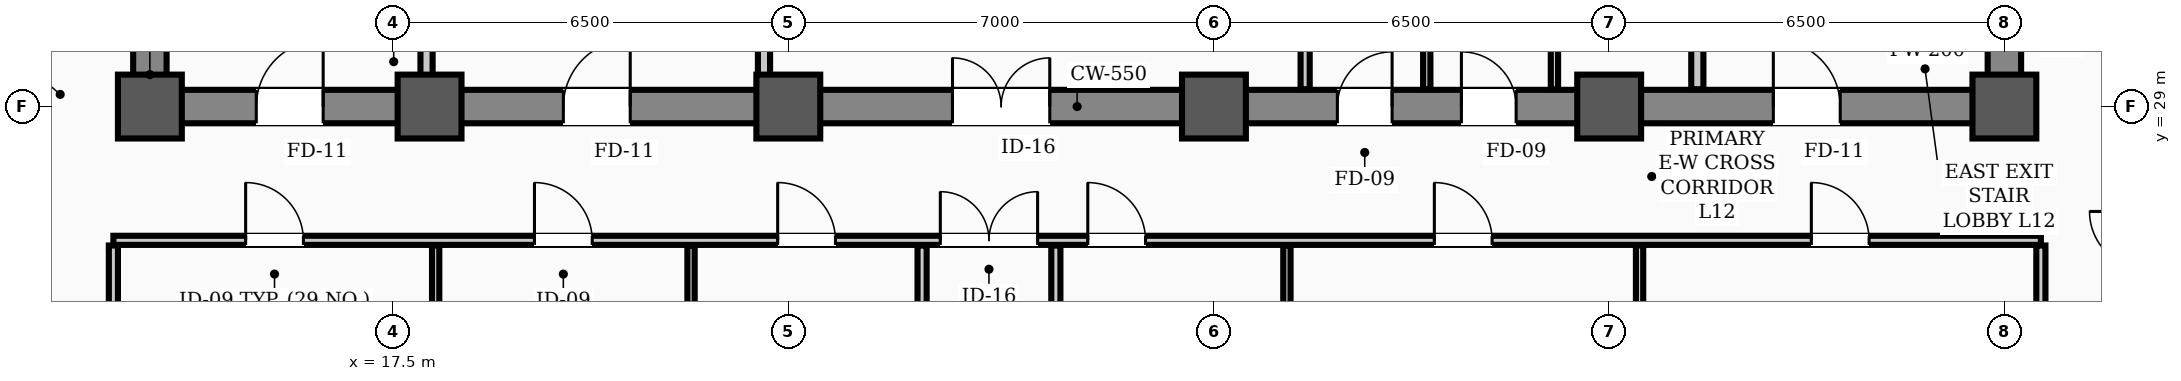
"""IFC4 building model, lengths in metres.
Left out: names, types, materials, properties, quantities, classifications, styles, units other than length and angle.
Written with IfcOpenShell. Run it as: python <this file> out.ifc"""

import sys

from ifc_helpers import new_model, si_unit, direction, frame, frame_2d, origin, origin_2d, place, context, subcontext, project, spatial, rectangle, hollow_rectangle, extrude, element, fill, save


model = new_model("IFC4")
c1 = context("Model", 3, precision=1e-05, world=origin(), true_north=direction((0.0, 1.0)))
c2 = subcontext(c1, "Body", "Model", "MODEL_VIEW")
j1 = project(units=[si_unit("LENGTHUNIT", "METRE"), si_unit("PLANEANGLEUNIT", "RADIAN")], contexts=[c1])
p1 = place(None, origin())
s1 = spatial("IfcSite", under=j1, at=p1, CompositionType="ELEMENT")
p2 = place(p1, origin())
s2 = spatial("IfcBuilding", under=s1, at=p2, CompositionType="ELEMENT")
p3 = place(p2, frame((0.0, 0.0, 49.9)))
s3 = spatial("IfcBuildingStorey", under=s2, at=p3, CompositionType="ELEMENT", Elevation=49.9)
for number, where, z_axis, x_axis in (
    (1, (13.5, 29.0, 0.0), (0.0, 0.0, 1.0), (1.0, 0.0, 0.0)),
    (2, (18.1, 29.0, 0.0), (0.0, 0.0, 1.0), (1.0, 0.0, 0.0)),
    (3, (24.0, 29.0, 0.0), (0.0, 0.0, 1.0), (1.0, 0.0, 0.0)),
    (4, (31.0, 29.0, 0.0), (0.0, 0.0, 1.0), (1.0, 0.0, 0.0)),
    (5, (37.5, 29.0, 0.0), (0.0, 0.0, 1.0), (1.0, 0.0, 0.0)),
    (6, (44.0, 29.0, 0.0), (0.0, 0.0, 1.0), (1.0, 0.0, 0.0)),
):
    element("IfcColumn", number, at=place(p3, frame(where, z_axis=z_axis, x_axis=x_axis)), inside=s3, PredefinedType="COLUMN", context=c2, shape_type="SweptSolid", body=[
        extrude(hollow_rectangle(XDim=1.05, YDim=1.05, WallThickness=0.038, InnerFilletRadius=0.019, OuterFilletRadius=0.057, at=origin_2d()), origin(), (0.0, 0.0, 1.0), 3.9),
    ])
p4 = place(p3, frame((13.5, 29.0, 0.0), z_axis=(0.0, 0.0, 1.0), x_axis=(1.0, 0.0, 0.0)))
e7 = element("IfcWall", 7, at=p4, inside=s3, PredefinedType="SHEAR", context=c2, shape_type="SweptSolid", body=[
    extrude(rectangle(XDim=30.5, YDim=0.55, at=frame_2d((15.25, 0.0))), origin(), (0.0, 0.0, 1.0), 3.66),
])
p5 = place(p4, frame((1.75, 0.0, 0.0)))
e8 = element("IfcOpeningElement", 8, at=p5, cuts=e7, PredefinedType="OPENING", context=c2, shape_type="SweptSolid", body=[
    extrude(rectangle(XDim=1.1, YDim=2.08, at=frame_2d((0.55, 1.04))), frame((0.0, 0.285, 0.0), z_axis=(0.0, -1.0, 0.0), x_axis=(1.0, 0.0, 0.0)), (0.0, 0.0, 1.0), 0.57),
])
p6 = place(p4, frame((26.7, 0.0, 0.0)))
e9 = element("IfcOpeningElement", 9, at=p6, cuts=e7, PredefinedType="OPENING", context=c2, shape_type="SweptSolid", body=[
    extrude(rectangle(XDim=1.1, YDim=2.08, at=frame_2d((0.55, 1.04))), frame((0.0, 0.285, 0.0), z_axis=(0.0, -1.0, 0.0), x_axis=(1.0, 0.0, 0.0)), (0.0, 0.0, 1.0), 0.57),
])
p7 = place(p4, frame((6.8, 0.0, 0.0)))
e10 = element("IfcOpeningElement", 10, at=p7, cuts=e7, PredefinedType="OPENING", context=c2, shape_type="SweptSolid", body=[
    extrude(rectangle(XDim=1.1, YDim=2.08, at=frame_2d((0.55, 1.04))), frame((0.0, 0.285, 0.0), z_axis=(0.0, -1.0, 0.0), x_axis=(1.0, 0.0, 0.0)), (0.0, 0.0, 1.0), 0.57),
])
p8 = place(p4, frame((13.2, 0.0, 0.0)))
e11 = element("IfcOpeningElement", 11, at=p8, cuts=e7, PredefinedType="OPENING", context=c2, shape_type="SweptSolid", body=[
    extrude(rectangle(XDim=1.6, YDim=2.08, at=frame_2d((0.8, 1.04))), frame((0.0, 0.285, 0.0), z_axis=(0.0, -1.0, 0.0), x_axis=(1.0, 0.0, 0.0)), (0.0, 0.0, 1.0), 0.57),
])
p9 = place(p4, frame((19.53, 0.0, 0.0)))
e12 = element("IfcOpeningElement", 12, at=p9, cuts=e7, PredefinedType="OPENING", context=c2, shape_type="SweptSolid", body=[
    extrude(rectangle(XDim=0.9, YDim=2.08, at=frame_2d((0.45, 1.04))), frame((0.0, 0.285, 0.0), z_axis=(0.0, -1.0, 0.0), x_axis=(1.0, 0.0, 0.0)), (0.0, 0.0, 1.0), 0.57),
])
p10 = place(p4, frame((21.57, 0.0, 0.0)))
e13 = element("IfcOpeningElement", 13, at=p10, cuts=e7, PredefinedType="OPENING", context=c2, shape_type="SweptSolid", body=[
    extrude(rectangle(XDim=0.9, YDim=2.08, at=frame_2d((0.45, 1.04))), frame((0.0, 0.285, 0.0), z_axis=(0.0, -1.0, 0.0), x_axis=(1.0, 0.0, 0.0)), (0.0, 0.0, 1.0), 0.57),
])
for number, where, z_axis, x_axis in (
    (14, (13.5, 29.35, 0.0), (0.0, 0.0, 1.0), (0.0, 1.0, 0.0)),
    (15, (44.0, 29.35, 0.0), (0.0, 0.0, 1.0), (0.0, 1.0, 0.0)),
):
    element("IfcWall", number, at=place(p3, frame(where, z_axis=z_axis, x_axis=x_axis)), inside=s3, PredefinedType="SHEAR", context=c2, shape_type="SweptSolid", body=[
        extrude(rectangle(XDim=8.6, YDim=0.55, at=frame_2d((4.3, 0.0))), origin(), (0.0, 0.0, 1.0), 3.66),
    ])
p11 = place(p3, frame((12.9, 26.8, 0.0), z_axis=(0.0, 0.0, 1.0), x_axis=(1.0, 0.0, 0.0)))
e16 = element("IfcWall", 16, at=p11, inside=s3, PredefinedType="PARTITIONING", context=c2, shape_type="SweptSolid", body=[
    extrude(rectangle(XDim=31.7, YDim=0.15, at=frame_2d((15.85, 0.0))), origin(), (0.0, 0.0, 1.0), 2.24),
])
p12 = place(p11, frame((13.6, 0.0, 0.0)))
e17 = element("IfcOpeningElement", 17, at=p12, cuts=e16, PredefinedType="OPENING", context=c2, shape_type="SweptSolid", body=[
    extrude(rectangle(XDim=1.6, YDim=2.08, at=frame_2d((0.8, 1.04))), frame((0.0, 0.085, 0.0), z_axis=(0.0, -1.0, 0.0), x_axis=(1.0, 0.0, 0.0)), (0.0, 0.0, 1.0), 0.17),
])
p13 = place(p11, frame((2.175, 0.0, 0.0)))
e18 = element("IfcOpeningElement", 18, at=p13, cuts=e16, PredefinedType="OPENING", context=c2, shape_type="SweptSolid", body=[
    extrude(rectangle(XDim=0.95, YDim=2.08, at=frame_2d((0.475, 1.04))), frame((0.0, 0.085, 0.0), z_axis=(0.0, -1.0, 0.0), x_axis=(1.0, 0.0, 0.0)), (0.0, 0.0, 1.0), 0.17),
])
p14 = place(p11, frame((6.925, 0.0, 0.0)))
e19 = element("IfcOpeningElement", 19, at=p14, cuts=e16, PredefinedType="OPENING", context=c2, shape_type="SweptSolid", body=[
    extrude(rectangle(XDim=0.95, YDim=2.08, at=frame_2d((0.475, 1.04))), frame((0.0, 0.085, 0.0), z_axis=(0.0, -1.0, 0.0), x_axis=(1.0, 0.0, 0.0)), (0.0, 0.0, 1.0), 0.17),
])
p15 = place(p11, frame((10.925, 0.0, 0.0)))
e20 = element("IfcOpeningElement", 20, at=p15, cuts=e16, PredefinedType="OPENING", context=c2, shape_type="SweptSolid", body=[
    extrude(rectangle(XDim=0.95, YDim=2.08, at=frame_2d((0.475, 1.04))), frame((0.0, 0.085, 0.0), z_axis=(0.0, -1.0, 0.0), x_axis=(1.0, 0.0, 0.0)), (0.0, 0.0, 1.0), 0.17),
])
p16 = place(p11, frame((16.025, 0.0, 0.0)))
e21 = element("IfcOpeningElement", 21, at=p16, cuts=e16, PredefinedType="OPENING", context=c2, shape_type="SweptSolid", body=[
    extrude(rectangle(XDim=0.95, YDim=2.08, at=frame_2d((0.475, 1.04))), frame((0.0, 0.085, 0.0), z_axis=(0.0, -1.0, 0.0), x_axis=(1.0, 0.0, 0.0)), (0.0, 0.0, 1.0), 0.17),
])
p17 = place(p11, frame((21.725, 0.0, 0.0)))
e22 = element("IfcOpeningElement", 22, at=p17, cuts=e16, PredefinedType="OPENING", context=c2, shape_type="SweptSolid", body=[
    extrude(rectangle(XDim=0.95, YDim=2.08, at=frame_2d((0.475, 1.04))), frame((0.0, 0.085, 0.0), z_axis=(0.0, -1.0, 0.0), x_axis=(1.0, 0.0, 0.0)), (0.0, 0.0, 1.0), 0.17),
])
p18 = place(p11, frame((27.925, 0.0, 0.0)))
e23 = element("IfcOpeningElement", 23, at=p18, cuts=e16, PredefinedType="OPENING", context=c2, shape_type="SweptSolid", body=[
    extrude(rectangle(XDim=0.95, YDim=2.08, at=frame_2d((0.475, 1.04))), frame((0.0, 0.085, 0.0), z_axis=(0.0, -1.0, 0.0), x_axis=(1.0, 0.0, 0.0)), (0.0, 0.0, 1.0), 0.17),
])
for number, where, z_axis, x_axis in (
    (24, (18.05, 29.285, 0.0), (0.0, 0.0, 1.0), (0.0, 1.0, 0.0)),
    (25, (38.95, 29.285, 0.0), (0.0, 0.0, 1.0), (0.0, 1.0, 0.0)),
):
    element("IfcWall", number, at=place(p3, frame(where, z_axis=z_axis, x_axis=x_axis)), inside=s3, PredefinedType="STANDARD", context=c2, shape_type="SweptSolid", body=[
        extrude(rectangle(XDim=1.015, YDim=0.2, at=frame_2d((0.508, 0.0))), origin(), (0.0, 0.0, 1.0), 2.24),
    ])
p19 = place(p3, frame((23.6, 29.285, 0.0), z_axis=(0.0, 0.0, 1.0), x_axis=(0.0, 1.0, 0.0)))
e26 = element("IfcWall", 26, at=p19, inside=s3, PredefinedType="STANDARD", context=c2, shape_type="SweptSolid", body=[
    extrude(rectangle(XDim=5.415, YDim=0.2, at=frame_2d((2.708, 0.0))), origin(), (0.0, 0.0, 1.0), 2.24),
])
p20 = place(p3, frame((32.5, 29.285, 0.0), z_axis=(0.0, 0.0, 1.0), x_axis=(0.0, 1.0, 0.0)))
e27 = element("IfcWall", 27, at=p20, inside=s3, PredefinedType="PARTITIONING", context=c2, shape_type="SweptSolid", body=[
    extrude(rectangle(XDim=2.48, YDim=0.15, at=frame_2d((1.24, 0.0))), origin(), (0.0, 0.0, 1.0), 2.24),
])
for number, where, z_axis, x_axis in (
    (28, (36.6, 29.285, 0.0), (0.0, 0.0, 1.0), (0.0, 1.0, 0.0)),
    (29, (34.5, 29.285, 0.0), (0.0, 0.0, 1.0), (0.0, 1.0, 0.0)),
):
    element("IfcWall", number, at=place(p3, frame(where, z_axis=z_axis, x_axis=x_axis)), inside=s3, PredefinedType="PARTITIONING", context=c2, shape_type="SweptSolid", body=[
        extrude(rectangle(XDim=2.48, YDim=0.12, at=frame_2d((1.24, 0.0))), origin(), (0.0, 0.0, 1.0), 2.24),
    ])
for number, where, z_axis, x_axis in (
    (30, (26.2, 19.335, 0.0), (0.0, 0.0, 1.0), (0.0, 1.0, 0.0)),
    (31, (28.4, 19.335, 0.0), (0.0, 0.0, 1.0), (0.0, 1.0, 0.0)),
    (32, (12.9, 19.335, 0.0), (0.0, 0.0, 1.0), (0.0, 1.0, 0.0)),
    (33, (44.6, 19.335, 0.0), (0.0, 0.0, 1.0), (0.0, 1.0, 0.0)),
):
    element("IfcWall", number, at=place(p3, frame(where, z_axis=z_axis, x_axis=x_axis)), inside=s3, PredefinedType="PARTITIONING", context=c2, shape_type="SweptSolid", body=[
        extrude(rectangle(XDim=7.38, YDim=0.15, at=frame_2d((3.69, 0.0))), origin(), (0.0, 0.0, 1.0), 2.24),
    ])
for number, where, z_axis, x_axis in (
    (34, (18.2, 19.335, 0.0), (0.0, 0.0, 1.0), (0.0, 1.0, 0.0)),
    (35, (22.4, 19.335, 0.0), (0.0, 0.0, 1.0), (0.0, 1.0, 0.0)),
    (36, (32.2, 19.335, 0.0), (0.0, 0.0, 1.0), (0.0, 1.0, 0.0)),
    (37, (38.0, 19.335, 0.0), (0.0, 0.0, 1.0), (0.0, 1.0, 0.0)),
):
    element("IfcWall", number, at=place(p3, frame(where, z_axis=z_axis, x_axis=x_axis)), inside=s3, PredefinedType="PARTITIONING", context=c2, shape_type="SweptSolid", body=[
        extrude(rectangle(XDim=7.38, YDim=0.12, at=frame_2d((3.69, 0.0))), origin(), (0.0, 0.0, 1.0), 2.24),
    ])
p21 = place(p5, origin())
e38 = element("IfcDoor", 38, at=p21, inside=s3, OperationType="SINGLE_SWING_RIGHT", PredefinedType="DOOR", context=c2, shape_type="SweptSolid", body=[
    extrude(rectangle(XDim=1.1, YDim=2.08, at=frame_2d((0.55, 1.04))), frame((0.0, 0.025, 0.0), z_axis=(0.0, -1.0, 0.0), x_axis=(1.0, 0.0, 0.0)), (0.0, 0.0, 1.0), 0.05),
])
fill(e8, e38)
p22 = place(p6, origin())
e39 = element("IfcDoor", 39, at=p22, inside=s3, OperationType="SINGLE_SWING_LEFT", PredefinedType="DOOR", context=c2, shape_type="SweptSolid", body=[
    extrude(rectangle(XDim=1.1, YDim=2.08, at=frame_2d((0.55, 1.04))), frame((0.0, 0.025, 0.0), z_axis=(0.0, -1.0, 0.0), x_axis=(1.0, 0.0, 0.0)), (0.0, 0.0, 1.0), 0.05),
])
fill(e9, e39)
p23 = place(p7, origin())
e40 = element("IfcDoor", 40, at=p23, inside=s3, OperationType="SINGLE_SWING_RIGHT", PredefinedType="DOOR", context=c2, shape_type="SweptSolid", body=[
    extrude(rectangle(XDim=1.1, YDim=2.08, at=frame_2d((0.55, 1.04))), frame((0.0, 0.025, 0.0), z_axis=(0.0, -1.0, 0.0), x_axis=(1.0, 0.0, 0.0)), (0.0, 0.0, 1.0), 0.05),
])
fill(e10, e40)
p24 = place(p8, origin())
e41 = element("IfcDoor", 41, at=p24, inside=s3, OperationType="DOUBLE_DOOR_SINGLE_SWING", PredefinedType="DOOR", context=c2, shape_type="SweptSolid", body=[
    extrude(rectangle(XDim=1.6, YDim=2.08, at=frame_2d((0.8, 1.04))), frame((0.0, 0.025, 0.0), z_axis=(0.0, -1.0, 0.0), x_axis=(1.0, 0.0, 0.0)), (0.0, 0.0, 1.0), 0.05),
])
fill(e11, e41)
p25 = place(p9, origin())
e42 = element("IfcDoor", 42, at=p25, inside=s3, OperationType="SINGLE_SWING_RIGHT", PredefinedType="DOOR", context=c2, shape_type="SweptSolid", body=[
    extrude(rectangle(XDim=0.9, YDim=2.08, at=frame_2d((0.45, 1.04))), frame((0.0, 0.025, 0.0), z_axis=(0.0, -1.0, 0.0), x_axis=(1.0, 0.0, 0.0)), (0.0, 0.0, 1.0), 0.05),
])
fill(e12, e42)
p26 = place(p10, origin())
e43 = element("IfcDoor", 43, at=p26, inside=s3, OperationType="SINGLE_SWING_LEFT", PredefinedType="DOOR", context=c2, shape_type="SweptSolid", body=[
    extrude(rectangle(XDim=0.9, YDim=2.08, at=frame_2d((0.45, 1.04))), frame((0.0, 0.025, 0.0), z_axis=(0.0, -1.0, 0.0), x_axis=(1.0, 0.0, 0.0)), (0.0, 0.0, 1.0), 0.05),
])
fill(e13, e43)
p27 = place(p12, origin())
e44 = element("IfcDoor", 44, at=p27, inside=s3, OperationType="DOUBLE_DOOR_SINGLE_SWING", PredefinedType="DOOR", context=c2, shape_type="SweptSolid", body=[
    extrude(rectangle(XDim=1.6, YDim=2.08, at=frame_2d((0.8, 1.04))), frame((0.0, 0.025, 0.0), z_axis=(0.0, -1.0, 0.0), x_axis=(1.0, 0.0, 0.0)), (0.0, 0.0, 1.0), 0.05),
])
fill(e17, e44)
p28 = place(p13, origin())
e45 = element("IfcDoor", 45, at=p28, inside=s3, OperationType="SINGLE_SWING_LEFT", PredefinedType="DOOR", context=c2, shape_type="SweptSolid", body=[
    extrude(rectangle(XDim=0.95, YDim=2.08, at=frame_2d((0.475, 1.04))), frame((0.0, 0.025, 0.0), z_axis=(0.0, -1.0, 0.0), x_axis=(1.0, 0.0, 0.0)), (0.0, 0.0, 1.0), 0.05),
])
fill(e18, e45)
p29 = place(p14, origin())
e46 = element("IfcDoor", 46, at=p29, inside=s3, OperationType="SINGLE_SWING_LEFT", PredefinedType="DOOR", context=c2, shape_type="SweptSolid", body=[
    extrude(rectangle(XDim=0.95, YDim=2.08, at=frame_2d((0.475, 1.04))), frame((0.0, 0.025, 0.0), z_axis=(0.0, -1.0, 0.0), x_axis=(1.0, 0.0, 0.0)), (0.0, 0.0, 1.0), 0.05),
])
fill(e19, e46)
p30 = place(p15, origin())
e47 = element("IfcDoor", 47, at=p30, inside=s3, OperationType="SINGLE_SWING_LEFT", PredefinedType="DOOR", context=c2, shape_type="SweptSolid", body=[
    extrude(rectangle(XDim=0.95, YDim=2.08, at=frame_2d((0.475, 1.04))), frame((0.0, 0.025, 0.0), z_axis=(0.0, -1.0, 0.0), x_axis=(1.0, 0.0, 0.0)), (0.0, 0.0, 1.0), 0.05),
])
fill(e20, e47)
p31 = place(p16, origin())
e48 = element("IfcDoor", 48, at=p31, inside=s3, OperationType="SINGLE_SWING_LEFT", PredefinedType="DOOR", context=c2, shape_type="SweptSolid", body=[
    extrude(rectangle(XDim=0.95, YDim=2.08, at=frame_2d((0.475, 1.04))), frame((0.0, 0.025, 0.0), z_axis=(0.0, -1.0, 0.0), x_axis=(1.0, 0.0, 0.0)), (0.0, 0.0, 1.0), 0.05),
])
fill(e21, e48)
p32 = place(p17, origin())
e49 = element("IfcDoor", 49, at=p32, inside=s3, OperationType="SINGLE_SWING_LEFT", PredefinedType="DOOR", context=c2, shape_type="SweptSolid", body=[
    extrude(rectangle(XDim=0.95, YDim=2.08, at=frame_2d((0.475, 1.04))), frame((0.0, 0.025, 0.0), z_axis=(0.0, -1.0, 0.0), x_axis=(1.0, 0.0, 0.0)), (0.0, 0.0, 1.0), 0.05),
])
fill(e22, e49)
p33 = place(p18, origin())
e50 = element("IfcDoor", 50, at=p33, inside=s3, OperationType="SINGLE_SWING_LEFT", PredefinedType="DOOR", context=c2, shape_type="SweptSolid", body=[
    extrude(rectangle(XDim=0.95, YDim=2.08, at=frame_2d((0.475, 1.04))), frame((0.0, 0.025, 0.0), z_axis=(0.0, -1.0, 0.0), x_axis=(1.0, 0.0, 0.0)), (0.0, 0.0, 1.0), 0.05),
])
fill(e23, e50)
save(model, sys.argv[1])
